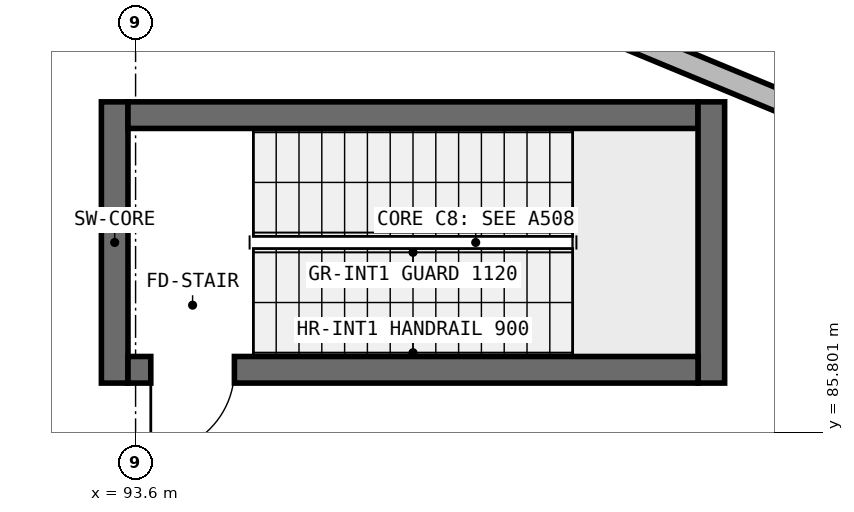
"""IFC4 building model, lengths in metres.
Left out: names, types, materials, properties, quantities, classifications, styles, units other than length and angle.
Written with IfcOpenShell. Run it as: python <this file> out.ifc"""

import sys

from ifc_helpers import new_model, si_unit, direction, frame, frame_2d, origin, place, context, subcontext, project, spatial, rectangle, extrude, element, fill, save


model = new_model("IFC4")
c1 = context("Model", 3, precision=1e-05, world=origin(), true_north=direction((0.0, 1.0)))
c2 = subcontext(c1, "Body", "Model", "MODEL_VIEW")
j1 = project(units=[si_unit("LENGTHUNIT", "METRE"), si_unit("PLANEANGLEUNIT", "RADIAN")], contexts=[c1])
p1 = place(None, origin())
s1 = spatial("IfcSite", under=j1, at=p1, CompositionType="ELEMENT")
p2 = place(p1, origin())
s2 = spatial("IfcBuilding", under=s1, at=p2, CompositionType="ELEMENT")
p3 = place(p2, origin())
s3 = spatial("IfcBuildingStorey", under=s2, at=p3, CompositionType="ELEMENT", Elevation=0.0)
p4 = place(p3, frame((93.325, 86.45, 0.0), z_axis=(0.0, 0.0, 1.0), x_axis=(0.0, 1.0, 0.0)))
e1 = element("IfcWall", 1, at=p4, inside=s3, PredefinedType="SHEAR", context=c2, shape_type="SweptSolid", body=[
    extrude(rectangle(XDim=3.7, YDim=0.35, at=frame_2d((1.85, 0.0))), origin(), (0.0, 0.0, 1.0), 5.25),
])
p5 = place(p3, frame((93.5, 89.975, 0.0), z_axis=(0.0, 0.0, 1.0), x_axis=(1.0, 0.0, 0.0)))
e2 = element("IfcWall", 2, at=p5, inside=s3, PredefinedType="SHEAR", context=c2, shape_type="SweptSolid", body=[
    extrude(rectangle(XDim=7.5, YDim=0.35, at=frame_2d((3.75, 0.0))), origin(), (0.0, 0.0, 1.0), 5.25),
])
p6 = place(p3, frame((101.175, 90.15, 0.0), z_axis=(0.0, 0.0, 1.0), x_axis=(0.0, -1.0, 0.0)))
e3 = element("IfcWall", 3, at=p6, inside=s3, PredefinedType="SHEAR", context=c2, shape_type="SweptSolid", body=[
    extrude(rectangle(XDim=3.7, YDim=0.35, at=frame_2d((1.85, 0.0))), origin(), (0.0, 0.0, 1.0), 5.25),
])
p7 = place(p3, frame((101.0, 86.625, 0.0), z_axis=(0.0, 0.0, 1.0), x_axis=(-1.0, 0.0, 0.0)))
e4 = element("IfcWall", 4, at=p7, inside=s3, PredefinedType="SHEAR", context=c2, shape_type="SweptSolid", body=[
    extrude(rectangle(XDim=7.5, YDim=0.35, at=frame_2d((3.75, 0.0))), origin(), (0.0, 0.0, 1.0), 5.25),
])
p8 = place(p7, frame((6.1, 0.0, 0.0)))
e5 = element("IfcOpeningElement", 5, at=p8, cuts=e4, PredefinedType="OPENING", context=c2, shape_type="SweptSolid", body=[
    extrude(rectangle(XDim=1.1, YDim=2.15, at=frame_2d((0.55, 1.075))), frame((0.0, 0.185, 0.0), z_axis=(0.0, -1.0, 0.0), x_axis=(1.0, 0.0, 0.0)), (0.0, 0.0, 1.0), 0.37),
])
p9 = place(p3, frame((106.325, 89.483, 0.0), z_axis=(0.0, 0.0, 1.0), x_axis=(-0.92385889973, 0.382733240508, 0.0)))
e6 = element("IfcWall", 6, at=p9, inside=s3, PredefinedType="SOLIDWALL", context=c2, shape_type="SweptSolid", body=[
    extrude(rectangle(XDim=10.081, YDim=0.29, at=frame_2d((5.04, 0.0))), origin(), (0.0, 0.0, 1.0), 5.07),
])
p10 = place(p9, frame((4.515, 0.0, 0.95)))
e7 = element("IfcOpeningElement", 7, at=p10, cuts=e6, PredefinedType="OPENING", context=c2, shape_type="SweptSolid", body=[
    extrude(rectangle(XDim=1.05, YDim=1.59, at=frame_2d((0.525, 0.795))), frame((0.0, 0.155, 0.0), z_axis=(0.0, -1.0, 0.0), x_axis=(1.0, 0.0, 0.0)), (0.0, 0.0, 1.0), 0.31),
])
p11 = place(p3, frame((96.748, 92.366, 0.0), z_axis=(0.0, 0.0, 1.0), x_axis=(0.923848052238, -0.382759423628, 0.0)))
e8 = element("IfcWall", 8, at=p11, inside=s3, PredefinedType="SOLIDWALL", context=c2, shape_type="SweptSolid", body=[
    extrude(rectangle(XDim=9.821, YDim=0.29, at=frame_2d((4.91, 0.0))), origin(), (0.0, 0.0, 1.0), 5.07),
])
p12 = place(p11, frame((1.765, 0.0, 0.95)))
e9 = element("IfcOpeningElement", 9, at=p12, cuts=e8, PredefinedType="OPENING", context=c2, shape_type="SweptSolid", body=[
    extrude(rectangle(XDim=1.38, YDim=1.56, at=frame_2d((0.69, 0.78))), frame((0.0, 0.155, 0.0), z_axis=(0.0, -1.0, 0.0), x_axis=(1.0, 0.0, 0.0)), (0.0, 0.0, 1.0), 0.31),
])
p13 = place(p11, frame((6.676, 0.0, 0.95)))
e10 = element("IfcOpeningElement", 10, at=p13, cuts=e8, PredefinedType="OPENING", context=c2, shape_type="SweptSolid", body=[
    extrude(rectangle(XDim=1.38, YDim=1.56, at=frame_2d((0.69, 0.78))), frame((0.0, 0.155, 0.0), z_axis=(0.0, -1.0, 0.0), x_axis=(1.0, 0.0, 0.0)), (0.0, 0.0, 1.0), 0.31),
])
p14 = place(p3, frame((101.7, 81.461, 0.0), z_axis=(0.0, 0.0, 1.0), x_axis=(0.499973530083, 0.866040685659, 0.0)))
e11 = element("IfcWall", 11, at=p14, inside=s3, PredefinedType="PARTITIONING", context=c2, shape_type="SweptSolid", body=[
    extrude(rectangle(XDim=8.081, YDim=0.15, at=frame_2d((4.04, 0.0))), origin(), (0.0, 0.0, 1.0), 4.598),
])
p15 = place(p8, origin())
e12 = element("IfcDoor", 12, at=p15, inside=s3, OperationType="SINGLE_SWING_RIGHT", PredefinedType="DOOR", context=c2, shape_type="SweptSolid", body=[
    extrude(rectangle(XDim=1.1, YDim=2.15, at=frame_2d((0.55, 1.075))), frame((0.0, 0.025, 0.0), z_axis=(0.0, -1.0, 0.0), x_axis=(1.0, 0.0, 0.0)), (0.0, 0.0, 1.0), 0.05),
])
fill(e5, e12)
save(model, sys.argv[1])
